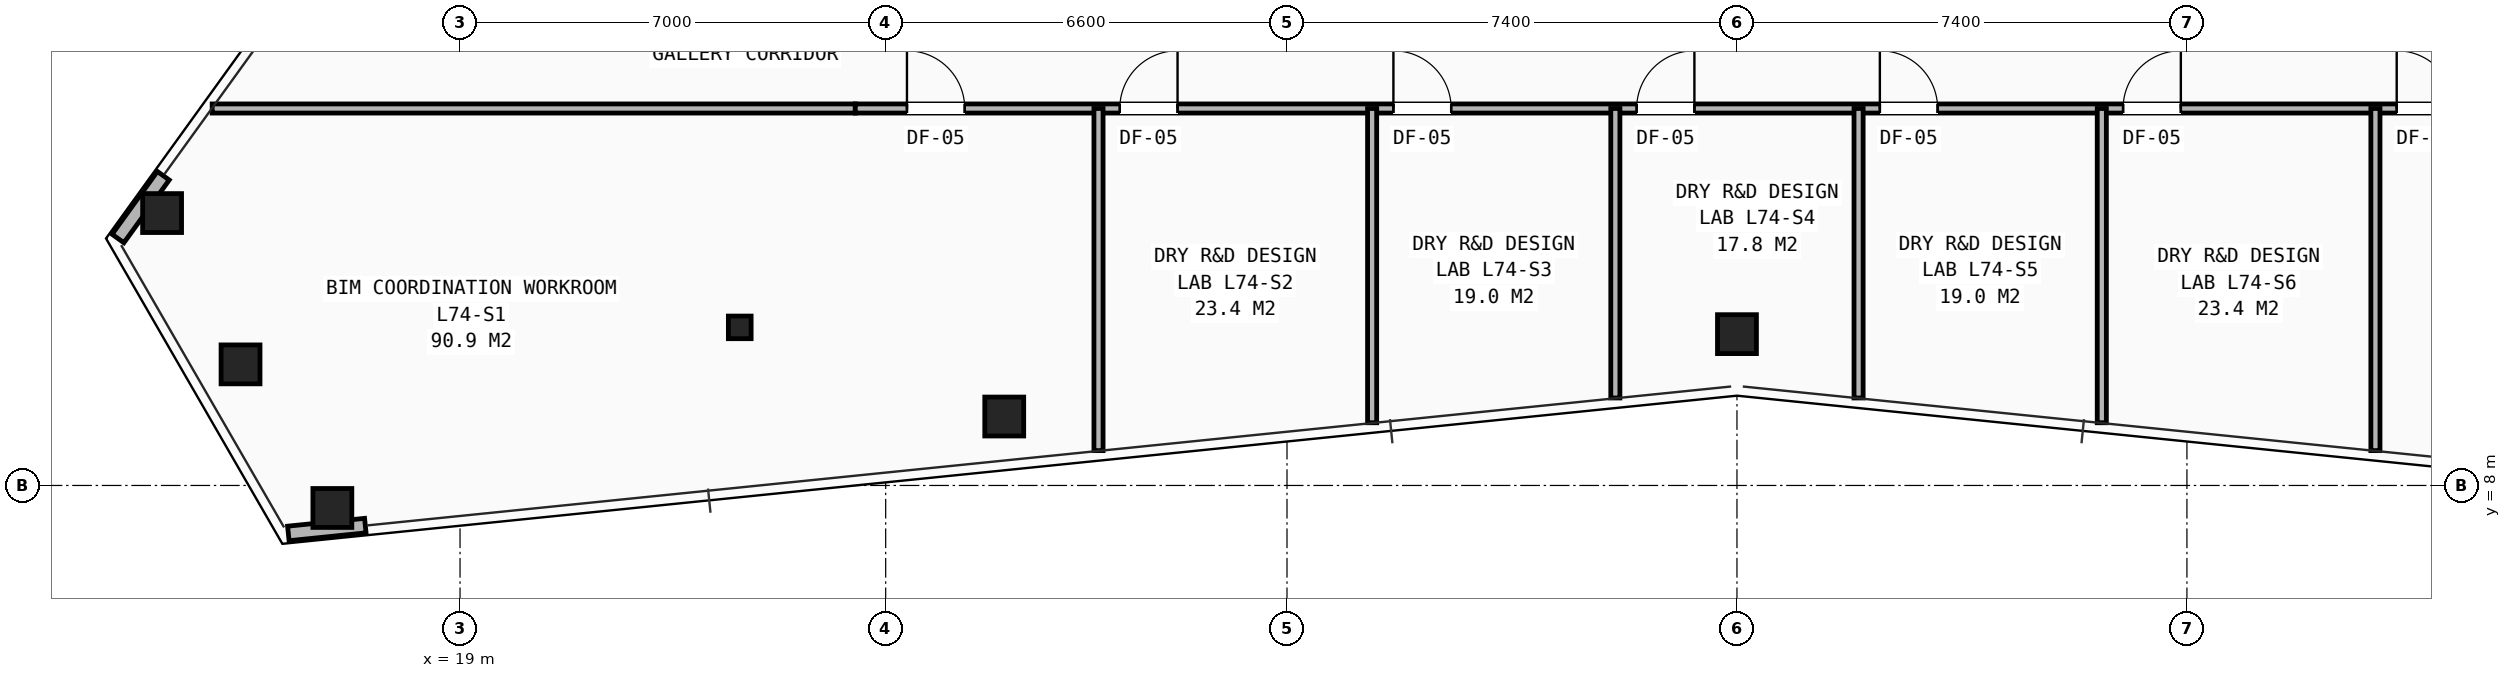
"""IFC4 building model, lengths in metres.
Left out: names, types, materials, properties, quantities, classifications, styles, units other than length and angle.
Written with IfcOpenShell. Run it as: python <this file> out.ifc"""

import sys

from ifc_helpers import new_model, si_unit, direction, frame, frame_2d, origin, origin_2d, place, context, subcontext, project, spatial, rectangle, hollow_rectangle, i_section, extrude, element, fill, save


model = new_model("IFC4")
c1 = context("Model", 3, precision=1e-05, world=origin(), true_north=direction((0.0, 1.0)))
c2 = subcontext(c1, "Body", "Model", "MODEL_VIEW")
j1 = project(units=[si_unit("LENGTHUNIT", "METRE"), si_unit("PLANEANGLEUNIT", "RADIAN")], contexts=[c1])
p1 = place(None, origin())
s1 = spatial("IfcSite", under=j1, at=p1, CompositionType="ELEMENT")
p2 = place(p1, origin())
s2 = spatial("IfcBuilding", under=s1, at=p2, CompositionType="ELEMENT")
p3 = place(p2, frame((0.0, 0.0, 262.0)))
s3 = spatial("IfcBuildingStorey", under=s2, at=p3, CompositionType="ELEMENT", Elevation=262.0)
p4 = place(p3, frame((23.6, 10.6, 0.0), z_axis=(0.0, 0.0, 1.0), x_axis=(1.0, 0.0, 0.0)))
e1 = element("IfcColumn", 1, at=p4, inside=s3, PredefinedType="COLUMN", context=c2, shape_type="SweptSolid", body=[
    extrude(i_section(OverallWidth=0.374, OverallDepth=0.372, WebThickness=0.016, FlangeThickness=0.026, at=origin_2d()), origin(), (0.0, 0.0, 1.0), 3.5),
])
for number, where, z_axis, x_axis in (
    (2, (14.1, 12.48, 0.0), (0.0, 0.0, 1.0), (1.0, 0.0, 0.0)),
    (3, (15.39, 9.991, 0.0), (0.0, 0.0, 1.0), (1.0, 0.0, 0.0)),
    (4, (16.9, 7.63, 0.0), (0.0, 0.0, 1.0), (1.0, 0.0, 0.0)),
    (5, (27.95, 9.134, 0.0), (0.0, 0.0, 1.0), (1.0, 0.0, 0.0)),
    (6, (40.0, 10.489, 0.0), (0.0, 0.0, 1.0), (1.0, 0.0, 0.0)),
):
    element("IfcColumn", number, at=place(p3, frame(where, z_axis=z_axis, x_axis=x_axis)), inside=s3, PredefinedType="COLUMN", context=c2, shape_type="SweptSolid", body=[
        extrude(hollow_rectangle(XDim=0.64, YDim=0.64, WallThickness=0.045, at=origin_2d()), origin(), (0.0, 0.0, 1.0), 3.5),
    ])
p5 = place(p3, frame((14.12, 13.094, 0.0), z_axis=(0.0, 0.0, 1.0), x_axis=(-0.585112505524, -0.810952129216, 0.0)))
e7 = element("IfcWall", 7, at=p5, inside=s3, PredefinedType="SHEAR", context=c2, shape_type="SweptSolid", body=[
    extrude(rectangle(XDim=1.273, YDim=0.24, at=frame_2d((0.637, 0.0))), origin(), (0.0, 0.0, 1.0), 2.623),
])
p6 = place(p3, frame((16.176, 7.211, 0.0), z_axis=(0.0, 0.0, 1.0), x_axis=(0.994855080115, 0.10130828974, 0.0)))
e8 = element("IfcWall", 8, at=p6, inside=s3, PredefinedType="SHEAR", context=c2, shape_type="SweptSolid", body=[
    extrude(rectangle(XDim=1.272, YDim=0.24, at=frame_2d((0.636, 0.0))), origin(), (0.0, 0.0, 1.0), 2.623),
])
p7 = place(p3, frame((14.924, 14.2, 0.0), z_axis=(0.0, 0.0, 1.0), x_axis=(1.0, 0.0, 0.0)))
e9 = element("IfcWall", 9, at=p7, inside=s3, PredefinedType="PARTITIONING", context=c2, shape_type="SweptSolid", body=[
    extrude(rectangle(XDim=10.576, YDim=0.15, at=frame_2d((5.288, 0.0))), origin(), (0.0, 0.0, 1.0), 2.265),
])
p8 = place(p3, frame((25.5, 14.2, 0.0), z_axis=(0.0, 0.0, 1.0), x_axis=(1.0, 0.0, 0.0)))
e10 = element("IfcWall", 10, at=p8, inside=s3, PredefinedType="PARTITIONING", context=c2, shape_type="SweptSolid", body=[
    extrude(rectangle(XDim=29.0, YDim=0.15, at=frame_2d((14.5, 0.0))), origin(), (0.0, 0.0, 1.0), 2.265),
])
p9 = place(p8, frame((0.85, 0.0, 0.0)))
e11 = element("IfcOpeningElement", 11, at=p9, cuts=e10, PredefinedType="OPENING", context=c2, shape_type="SweptSolid", body=[
    extrude(rectangle(XDim=0.95, YDim=2.1, at=frame_2d((0.475, 1.05))), frame((0.0, 0.085, 0.0), z_axis=(0.0, -1.0, 0.0), x_axis=(1.0, 0.0, 0.0)), (0.0, 0.0, 1.0), 0.17),
])
p10 = place(p8, frame((4.35, 0.0, 0.0)))
e12 = element("IfcOpeningElement", 12, at=p10, cuts=e10, PredefinedType="OPENING", context=c2, shape_type="SweptSolid", body=[
    extrude(rectangle(XDim=0.95, YDim=2.1, at=frame_2d((0.475, 1.05))), frame((0.0, 0.085, 0.0), z_axis=(0.0, -1.0, 0.0), x_axis=(1.0, 0.0, 0.0)), (0.0, 0.0, 1.0), 0.17),
])
p11 = place(p8, frame((8.85, 0.0, 0.0)))
e13 = element("IfcOpeningElement", 13, at=p11, cuts=e10, PredefinedType="OPENING", context=c2, shape_type="SweptSolid", body=[
    extrude(rectangle(XDim=0.95, YDim=2.1, at=frame_2d((0.475, 1.05))), frame((0.0, 0.085, 0.0), z_axis=(0.0, -1.0, 0.0), x_axis=(1.0, 0.0, 0.0)), (0.0, 0.0, 1.0), 0.17),
])
p12 = place(p8, frame((12.85, 0.0, 0.0)))
e14 = element("IfcOpeningElement", 14, at=p12, cuts=e10, PredefinedType="OPENING", context=c2, shape_type="SweptSolid", body=[
    extrude(rectangle(XDim=0.95, YDim=2.1, at=frame_2d((0.475, 1.05))), frame((0.0, 0.085, 0.0), z_axis=(0.0, -1.0, 0.0), x_axis=(1.0, 0.0, 0.0)), (0.0, 0.0, 1.0), 0.17),
])
p13 = place(p8, frame((16.85, 0.0, 0.0)))
e15 = element("IfcOpeningElement", 15, at=p13, cuts=e10, PredefinedType="OPENING", context=c2, shape_type="SweptSolid", body=[
    extrude(rectangle(XDim=0.95, YDim=2.1, at=frame_2d((0.475, 1.05))), frame((0.0, 0.085, 0.0), z_axis=(0.0, -1.0, 0.0), x_axis=(1.0, 0.0, 0.0)), (0.0, 0.0, 1.0), 0.17),
])
p14 = place(p8, frame((20.85, 0.0, 0.0)))
e16 = element("IfcOpeningElement", 16, at=p14, cuts=e10, PredefinedType="OPENING", context=c2, shape_type="SweptSolid", body=[
    extrude(rectangle(XDim=0.95, YDim=2.1, at=frame_2d((0.475, 1.05))), frame((0.0, 0.085, 0.0), z_axis=(0.0, -1.0, 0.0), x_axis=(1.0, 0.0, 0.0)), (0.0, 0.0, 1.0), 0.17),
])
p15 = place(p8, frame((25.35, 0.0, 0.0)))
e17 = element("IfcOpeningElement", 17, at=p15, cuts=e10, PredefinedType="OPENING", context=c2, shape_type="SweptSolid", body=[
    extrude(rectangle(XDim=0.95, YDim=2.1, at=frame_2d((0.475, 1.05))), frame((0.0, 0.085, 0.0), z_axis=(0.0, -1.0, 0.0), x_axis=(1.0, 0.0, 0.0)), (0.0, 0.0, 1.0), 0.17),
])
p16 = place(p3, frame((29.5, 8.573, 0.0), z_axis=(0.0, 0.0, 1.0), x_axis=(0.0, 1.0, 0.0)))
e18 = element("IfcWall", 18, at=p16, inside=s3, PredefinedType="PARTITIONING", context=c2, shape_type="SweptSolid", body=[
    extrude(rectangle(XDim=5.627, YDim=0.15, at=frame_2d((2.813, 0.0))), origin(), (0.0, 0.0, 1.0), 2.628),
])
p17 = place(p3, frame((34.0, 9.031, 0.0), z_axis=(0.0, 0.0, 1.0), x_axis=(0.0, 1.0, 0.0)))
e19 = element("IfcWall", 19, at=p17, inside=s3, PredefinedType="PARTITIONING", context=c2, shape_type="SweptSolid", body=[
    extrude(rectangle(XDim=5.168, YDim=0.15, at=frame_2d((2.584, 0.0))), origin(), (0.0, 0.0, 1.0), 2.628),
])
p18 = place(p3, frame((38.0, 9.439, 0.0), z_axis=(0.0, 0.0, 1.0), x_axis=(0.0, 1.0, 0.0)))
e20 = element("IfcWall", 20, at=p18, inside=s3, PredefinedType="PARTITIONING", context=c2, shape_type="SweptSolid", body=[
    extrude(rectangle(XDim=4.761, YDim=0.15, at=frame_2d((2.381, 0.0))), origin(), (0.0, 0.0, 1.0), 2.265),
])
p19 = place(p3, frame((42.0, 9.439, 0.0), z_axis=(0.0, 0.0, 1.0), x_axis=(0.0, 1.0, 0.0)))
e21 = element("IfcWall", 21, at=p19, inside=s3, PredefinedType="PARTITIONING", context=c2, shape_type="SweptSolid", body=[
    extrude(rectangle(XDim=4.761, YDim=0.15, at=frame_2d((2.381, 0.0))), origin(), (0.0, 0.0, 1.0), 2.628),
])
p20 = place(p3, frame((46.0, 9.031, 0.0), z_axis=(0.0, 0.0, 1.0), x_axis=(0.0, 1.0, 0.0)))
e22 = element("IfcWall", 22, at=p20, inside=s3, PredefinedType="PARTITIONING", context=c2, shape_type="SweptSolid", body=[
    extrude(rectangle(XDim=5.168, YDim=0.15, at=frame_2d((2.584, 0.0))), origin(), (0.0, 0.0, 1.0), 2.628),
])
p21 = place(p3, frame((50.5, 8.573, 0.0), z_axis=(0.0, 0.0, 1.0), x_axis=(0.0, 1.0, 0.0)))
e23 = element("IfcWall", 23, at=p21, inside=s3, PredefinedType="PARTITIONING", context=c2, shape_type="SweptSolid", body=[
    extrude(rectangle(XDim=5.627, YDim=0.15, at=frame_2d((2.813, 0.0))), origin(), (0.0, 0.0, 1.0), 2.628),
])
p22 = place(p9, origin())
e24 = element("IfcDoor", 24, at=p22, inside=s3, OperationType="SINGLE_SWING_LEFT", PredefinedType="DOOR", context=c2, shape_type="SweptSolid", body=[
    extrude(rectangle(XDim=0.95, YDim=2.1, at=frame_2d((0.475, 1.05))), frame((0.0, 0.025, 0.0), z_axis=(0.0, -1.0, 0.0), x_axis=(1.0, 0.0, 0.0)), (0.0, 0.0, 1.0), 0.05),
])
fill(e11, e24)
p23 = place(p10, origin())
e25 = element("IfcDoor", 25, at=p23, inside=s3, OperationType="SINGLE_SWING_RIGHT", PredefinedType="DOOR", context=c2, shape_type="SweptSolid", body=[
    extrude(rectangle(XDim=0.95, YDim=2.1, at=frame_2d((0.475, 1.05))), frame((0.0, 0.025, 0.0), z_axis=(0.0, -1.0, 0.0), x_axis=(1.0, 0.0, 0.0)), (0.0, 0.0, 1.0), 0.05),
])
fill(e12, e25)
p24 = place(p11, origin())
e26 = element("IfcDoor", 26, at=p24, inside=s3, OperationType="SINGLE_SWING_LEFT", PredefinedType="DOOR", context=c2, shape_type="SweptSolid", body=[
    extrude(rectangle(XDim=0.95, YDim=2.1, at=frame_2d((0.475, 1.05))), frame((0.0, 0.025, 0.0), z_axis=(0.0, -1.0, 0.0), x_axis=(1.0, 0.0, 0.0)), (0.0, 0.0, 1.0), 0.05),
])
fill(e13, e26)
p25 = place(p12, origin())
e27 = element("IfcDoor", 27, at=p25, inside=s3, OperationType="SINGLE_SWING_RIGHT", PredefinedType="DOOR", context=c2, shape_type="SweptSolid", body=[
    extrude(rectangle(XDim=0.95, YDim=2.1, at=frame_2d((0.475, 1.05))), frame((0.0, 0.025, 0.0), z_axis=(0.0, -1.0, 0.0), x_axis=(1.0, 0.0, 0.0)), (0.0, 0.0, 1.0), 0.05),
])
fill(e14, e27)
p26 = place(p13, origin())
e28 = element("IfcDoor", 28, at=p26, inside=s3, OperationType="SINGLE_SWING_LEFT", PredefinedType="DOOR", context=c2, shape_type="SweptSolid", body=[
    extrude(rectangle(XDim=0.95, YDim=2.1, at=frame_2d((0.475, 1.05))), frame((0.0, 0.025, 0.0), z_axis=(0.0, -1.0, 0.0), x_axis=(1.0, 0.0, 0.0)), (0.0, 0.0, 1.0), 0.05),
])
fill(e15, e28)
p27 = place(p14, origin())
e29 = element("IfcDoor", 29, at=p27, inside=s3, OperationType="SINGLE_SWING_RIGHT", PredefinedType="DOOR", context=c2, shape_type="SweptSolid", body=[
    extrude(rectangle(XDim=0.95, YDim=2.1, at=frame_2d((0.475, 1.05))), frame((0.0, 0.025, 0.0), z_axis=(0.0, -1.0, 0.0), x_axis=(1.0, 0.0, 0.0)), (0.0, 0.0, 1.0), 0.05),
])
fill(e16, e29)
p28 = place(p15, origin())
e30 = element("IfcDoor", 30, at=p28, inside=s3, OperationType="SINGLE_SWING_LEFT", PredefinedType="DOOR", context=c2, shape_type="SweptSolid", body=[
    extrude(rectangle(XDim=0.95, YDim=2.1, at=frame_2d((0.475, 1.05))), frame((0.0, 0.025, 0.0), z_axis=(0.0, -1.0, 0.0), x_axis=(1.0, 0.0, 0.0)), (0.0, 0.0, 1.0), 0.05),
])
fill(e17, e30)
save(model, sys.argv[1])
